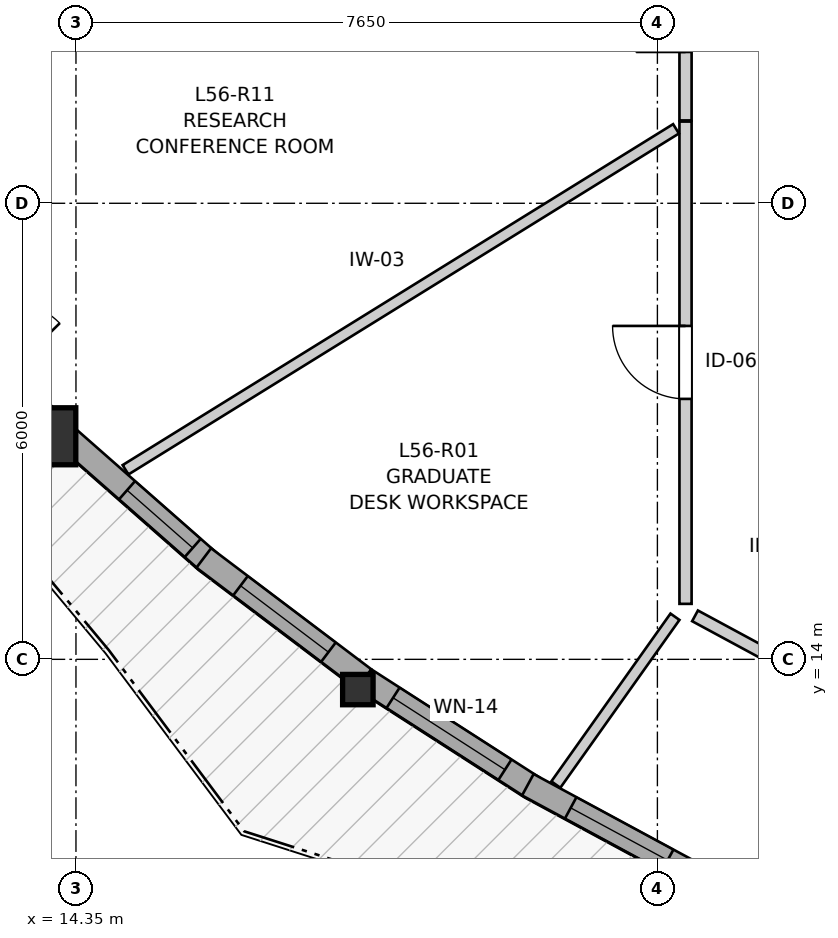
"""IFC4 building model, lengths in metres.
Left out: names, types, materials, properties, quantities, classifications, styles, units other than length and angle.
Written with IfcOpenShell. Run it as: python <this file> out.ifc"""

import sys

from ifc_helpers import new_model, si_unit, direction, frame, frame_2d, origin, origin_2d, place, context, subcontext, project, spatial, rectangle, i_section, extrude, source, transform, mapped, element, fill, save


model = new_model("IFC4")
c1 = context("Model", 3, precision=1e-05, world=origin(), true_north=direction((0.0, 1.0)))
c2 = subcontext(c1, "Body", "Model", "MODEL_VIEW")
j1 = project(units=[si_unit("LENGTHUNIT", "METRE"), si_unit("PLANEANGLEUNIT", "RADIAN")], contexts=[c1])
p1 = place(None, origin())
s1 = spatial("IfcSite", under=j1, at=p1, CompositionType="ELEMENT")
p2 = place(p1, origin())
s2 = spatial("IfcBuilding", under=s1, at=p2, CompositionType="ELEMENT")
p3 = place(p2, frame((0.0, 0.0, 187.4)))
s3 = spatial("IfcBuildingStorey", under=s2, at=p3, CompositionType="ELEMENT", Elevation=187.4)
m1 = source(origin(), c2, "Body", "SweptSolid", [
    extrude(rectangle(XDim=0.75, YDim=0.75, at=origin_2d()), origin(), (0.0, 0.0, 1.0), 2.9),
])
p4 = place(p3, frame((13.973, 16.935, 0.0), z_axis=(0.0, 0.0, 1.0), x_axis=(1.0, 0.0, 0.0)))
e1 = element("IfcColumn", 1, at=p4, inside=s3, PredefinedType="COLUMN", context=c2, shape_type="MappedRepresentation", body=[
    mapped(m1, transform((0.0, 0.0, 0.0), x_axis=(1.0, 0.0, 0.0), y_axis=(0.0, 1.0, 0.0), z_axis=(0.0, 0.0, 1.0), scale=1.0)),
])
m2 = source(origin(), c2, "Body", "SweptSolid", [
    extrude(i_section(OverallWidth=0.401, OverallDepth=0.399, WebThickness=0.023, FlangeThickness=0.036, FilletRadius=0.015, at=origin_2d()), origin(), (0.0, 0.0, 1.0), 2.9),
])
p5 = place(p3, frame((18.059, 13.602, 0.0), z_axis=(0.0, 0.0, 1.0), x_axis=(1.0, 0.0, 0.0)))
e2 = element("IfcColumn", 2, at=p5, inside=s3, PredefinedType="PILASTER", context=c2, shape_type="MappedRepresentation", body=[
    mapped(m2, transform((0.0, 0.0, 0.0), x_axis=(1.0, 0.0, 0.0), y_axis=(0.0, 1.0, 0.0), z_axis=(0.0, 0.0, 1.0), scale=1.0)),
])
p6 = place(p3, frame((12.168, 18.996, 0.0), z_axis=(0.0, 0.0, 1.0), x_axis=(0.701479569818, -0.712689562943, 0.0)))
e3 = element("IfcWall", 3, at=p6, inside=s3, PredefinedType="SOLIDWALL", context=c2, shape_type="SweptSolid", body=[
    extrude(rectangle(XDim=2.57, YDim=0.32, at=frame_2d((1.285, 0.0))), origin(), (0.0, 0.0, 1.0), 2.48),
])
p7 = place(p6, frame((0.79, 0.0, 0.0)))
e4 = element("IfcOpeningElement", 4, at=p7, cuts=e3, PredefinedType="OPENING", context=c2, shape_type="SweptSolid", body=[
    extrude(rectangle(XDim=1.0, YDim=2.1, at=frame_2d((0.5, 1.05))), frame((0.0, 0.17, 0.0), z_axis=(0.0, -1.0, 0.0), x_axis=(1.0, 0.0, 0.0)), (0.0, 0.0, 1.0), 0.34),
])
p8 = place(p3, frame((14.202, 16.946, 0.0), z_axis=(0.0, 0.0, 1.0), x_axis=(0.751119873672, -0.660165839297, 0.0)))
e5 = element("IfcWall", 5, at=p8, inside=s3, PredefinedType="SOLIDWALL", context=c2, shape_type="SweptSolid", body=[
    extrude(rectangle(XDim=2.526, YDim=0.32, at=frame_2d((1.263, 0.0))), origin(), (0.0, 0.0, 1.0), 2.48),
])
p9 = place(p8, frame((1.092, 0.0, 0.82)))
e6 = element("IfcOpeningElement", 6, at=p9, cuts=e5, PredefinedType="OPENING", context=c2, shape_type="SweptSolid", body=[
    extrude(rectangle(XDim=1.15, YDim=1.2, at=frame_2d((0.575, 0.6))), frame((0.0, 0.17, 0.0), z_axis=(0.0, -1.0, 0.0), x_axis=(1.0, 0.0, 0.0)), (0.0, 0.0, 1.0), 0.34),
])
p10 = place(p3, frame((16.031, 15.334, 0.0), z_axis=(0.0, 0.0, 1.0), x_axis=(0.797976962718, -0.602687951573, 0.0)))
e7 = element("IfcWall", 7, at=p10, inside=s3, PredefinedType="SOLIDWALL", context=c2, shape_type="SweptSolid", body=[
    extrude(rectangle(XDim=2.642, YDim=0.32, at=frame_2d((1.321, 0.0))), origin(), (0.0, 0.0, 1.0), 2.48),
])
p11 = place(p10, frame((0.606, 0.0, 0.82)))
e8 = element("IfcOpeningElement", 8, at=p11, cuts=e7, PredefinedType="OPENING", context=c2, shape_type="SweptSolid", body=[
    extrude(rectangle(XDim=1.45, YDim=1.25, at=frame_2d((0.725, 0.625))), frame((0.0, 0.17, 0.0), z_axis=(0.0, -1.0, 0.0), x_axis=(1.0, 0.0, 0.0)), (0.0, 0.0, 1.0), 0.34),
])
p12 = place(p3, frame((18.162, 13.726, 0.0), z_axis=(0.0, 0.0, 1.0), x_axis=(0.841187536261, -0.540743496345, 0.0)))
e9 = element("IfcWall", 9, at=p12, inside=s3, PredefinedType="SOLIDWALL", context=c2, shape_type="SweptSolid", body=[
    extrude(rectangle(XDim=2.626, YDim=0.32, at=frame_2d((1.313, 0.0))), origin(), (0.0, 0.0, 1.0), 2.48),
])
p13 = place(p12, frame((0.428, 0.0, 0.82)))
e10 = element("IfcOpeningElement", 10, at=p13, cuts=e9, PredefinedType="OPENING", context=c2, shape_type="SweptSolid", body=[
    extrude(rectangle(XDim=1.75, YDim=1.3, at=frame_2d((0.875, 0.65))), frame((0.0, 0.17, 0.0), z_axis=(0.0, -1.0, 0.0), x_axis=(1.0, 0.0, 0.0)), (0.0, 0.0, 1.0), 0.34),
])
p14 = place(p3, frame((20.295, 12.351, 0.0), z_axis=(0.0, 0.0, 1.0), x_axis=(0.879809944858, -0.475325636726, 0.0)))
e11 = element("IfcWall", 11, at=p14, inside=s3, PredefinedType="SOLIDWALL", context=c2, shape_type="SweptSolid", body=[
    extrude(rectangle(XDim=2.481, YDim=0.32, at=frame_2d((1.241, 0.0))), origin(), (0.0, 0.0, 1.0), 2.48),
])
p15 = place(p14, frame((0.641, 0.0, 0.82)))
e12 = element("IfcOpeningElement", 12, at=p15, cuts=e11, PredefinedType="OPENING", context=c2, shape_type="SweptSolid", body=[
    extrude(rectangle(XDim=1.45, YDim=1.25, at=frame_2d((0.725, 0.625))), frame((0.0, 0.17, 0.0), z_axis=(0.0, -1.0, 0.0), x_axis=(1.0, 0.0, 0.0)), (0.0, 0.0, 1.0), 0.34),
])
p16 = place(p3, frame((22.37, 14.73, 0.0), z_axis=(0.0, 0.0, 1.0), x_axis=(0.0, 1.0, 0.0)))
e13 = element("IfcWall", 13, at=p16, inside=s3, PredefinedType="PARTITIONING", context=c2, shape_type="SweptSolid", body=[
    extrude(rectangle(XDim=6.345, YDim=0.16, at=frame_2d((3.172, 0.0))), origin(), (0.0, 0.0, 1.0), 2.9),
])
p17 = place(p16, frame((2.697, 0.0, 0.0)))
e14 = element("IfcOpeningElement", 14, at=p17, cuts=e13, PredefinedType="OPENING", context=c2, shape_type="SweptSolid", body=[
    extrude(rectangle(XDim=0.96, YDim=2.1, at=frame_2d((0.48, 1.05))), frame((0.0, 0.09, 0.0), z_axis=(0.0, -1.0, 0.0), x_axis=(1.0, 0.0, 0.0)), (0.0, 0.0, 1.0), 0.18),
])
p18 = place(p3, frame((22.37, 21.09, 0.0), z_axis=(0.0, 0.0, 1.0), x_axis=(0.0, 1.0, 0.0)))
e15 = element("IfcWall", 15, at=p18, inside=s3, PredefinedType="PARTITIONING", context=c2, shape_type="SweptSolid", body=[
    extrude(rectangle(XDim=3.06, YDim=0.16, at=frame_2d((1.53, 0.0))), origin(), (0.0, 0.0, 1.0), 2.9),
])
p19 = place(p18, frame((0.901, 0.0, 0.0)))
e16 = element("IfcOpeningElement", 16, at=p19, cuts=e15, PredefinedType="OPENING", context=c2, shape_type="SweptSolid", body=[
    extrude(rectangle(XDim=1.3, YDim=2.1, at=frame_2d((0.65, 1.05))), frame((0.0, 0.09, 0.0), z_axis=(0.0, -1.0, 0.0), x_axis=(1.0, 0.0, 0.0)), (0.0, 0.0, 1.0), 0.18),
])
p20 = place(p3, frame((15.002, 16.494, 0.0), z_axis=(0.0, 0.0, 1.0), x_axis=(0.850179022177, 0.5264937134, 0.0)))
e17 = element("IfcWall", 17, at=p20, inside=s3, PredefinedType="PARTITIONING", context=c2, shape_type="SweptSolid", body=[
    extrude(rectangle(XDim=8.519, YDim=0.145, at=frame_2d((4.26, 0.0))), origin(), (0.0, 0.0, 1.0), 2.9),
])
p21 = place(p3, frame((20.664, 12.352, 0.0), z_axis=(0.0, 0.0, 1.0), x_axis=(0.578847584957, 0.815435756752, 0.0)))
e18 = element("IfcWall", 18, at=p21, inside=s3, PredefinedType="PARTITIONING", context=c2, shape_type="SweptSolid", body=[
    extrude(rectangle(XDim=2.708, YDim=0.145, at=frame_2d((1.354, 0.0))), origin(), (0.0, 0.0, 1.0), 2.9),
])
p22 = place(p3, frame((22.495, 14.573, 0.0), z_axis=(0.0, 0.0, 1.0), x_axis=(0.879785217584, -0.475371403137, 0.0)))
e19 = element("IfcWall", 19, at=p22, inside=s3, PredefinedType="PARTITIONING", context=c2, shape_type="SweptSolid", body=[
    extrude(rectangle(XDim=1.648, YDim=0.16, at=frame_2d((0.824, 0.0))), origin(), (0.0, 0.0, 1.0), 2.9),
])
m3 = source(origin(), c2, "Body", "SweptSolid", [
    extrude(rectangle(XDim=1.15, YDim=1.2, at=frame_2d((0.575, 0.6))), frame((0.0, 0.03, 0.0), z_axis=(0.0, -1.0, 0.0), x_axis=(1.0, 0.0, 0.0)), (0.0, 0.0, 1.0), 0.06),
])
p23 = place(p9, origin())
e20 = element("IfcWindow", 20, at=p23, inside=s3, PartitioningType="SINGLE_PANEL", PredefinedType="WINDOW", context=c2, shape_type="MappedRepresentation", body=[
    mapped(m3, transform((0.0, 0.0, 0.0), x_axis=(1.0, 0.0, 0.0), y_axis=(0.0, 1.0, 0.0), z_axis=(0.0, 0.0, 1.0), scale=1.0)),
])
fill(e6, e20)
m4 = source(origin(), c2, "Body", "SweptSolid", [
    extrude(rectangle(XDim=1.45, YDim=1.25, at=frame_2d((0.725, 0.625))), frame((0.0, 0.03, 0.0), z_axis=(0.0, -1.0, 0.0), x_axis=(1.0, 0.0, 0.0)), (0.0, 0.0, 1.0), 0.06),
])
p24 = place(p11, origin())
e21 = element("IfcWindow", 21, at=p24, inside=s3, PartitioningType="SINGLE_PANEL", PredefinedType="WINDOW", context=c2, shape_type="MappedRepresentation", body=[
    mapped(m4, transform((0.0, 0.0, 0.0), x_axis=(1.0, 0.0, 0.0), y_axis=(0.0, 1.0, 0.0), z_axis=(0.0, 0.0, 1.0), scale=1.0)),
])
fill(e8, e21)
m5 = source(origin(), c2, "Body", "SweptSolid", [
    extrude(rectangle(XDim=1.75, YDim=1.3, at=frame_2d((0.875, 0.65))), frame((0.0, 0.03, 0.0), z_axis=(0.0, -1.0, 0.0), x_axis=(1.0, 0.0, 0.0)), (0.0, 0.0, 1.0), 0.06),
])
p25 = place(p13, origin())
e22 = element("IfcWindow", 22, at=p25, inside=s3, PartitioningType="SINGLE_PANEL", PredefinedType="WINDOW", context=c2, shape_type="MappedRepresentation", body=[
    mapped(m5, transform((0.0, 0.0, 0.0), x_axis=(1.0, 0.0, 0.0), y_axis=(0.0, 1.0, 0.0), z_axis=(0.0, 0.0, 1.0), scale=1.0)),
])
fill(e10, e22)
p26 = place(p15, origin())
e23 = element("IfcWindow", 23, at=p26, inside=s3, PartitioningType="SINGLE_PANEL", PredefinedType="WINDOW", context=c2, shape_type="MappedRepresentation", body=[
    mapped(m4, transform((0.0, 0.0, 0.0), x_axis=(1.0, 0.0, 0.0), y_axis=(0.0, 1.0, 0.0), z_axis=(0.0, 0.0, 1.0), scale=1.0)),
])
fill(e12, e23)
m6 = source(origin(), c2, "Body", "SweptSolid", [
    extrude(rectangle(XDim=0.96, YDim=2.1, at=frame_2d((0.48, 1.05))), frame((0.0, 0.025, 0.0), z_axis=(0.0, -1.0, 0.0), x_axis=(1.0, 0.0, 0.0)), (0.0, 0.0, 1.0), 0.05),
])
p27 = place(p17, origin())
e24 = element("IfcDoor", 24, at=p27, inside=s3, OperationType="SINGLE_SWING_RIGHT", PredefinedType="DOOR", context=c2, shape_type="MappedRepresentation", body=[
    mapped(m6, transform((0.0, 0.0, 0.0), x_axis=(1.0, 0.0, 0.0), y_axis=(0.0, 1.0, 0.0), z_axis=(0.0, 0.0, 1.0), scale=1.0)),
])
fill(e14, e24)
save(model, sys.argv[1])
